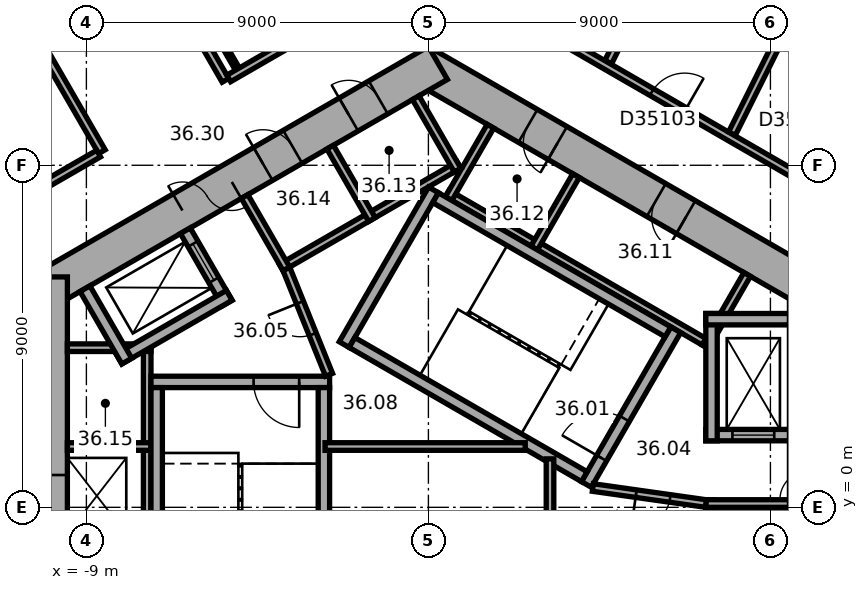
"""IFC4 building model, lengths in metres.
Left out: names, types, materials, properties, quantities, classifications, styles, units other than length and angle.
Written with IfcOpenShell. Run it as: python <this file> out.ifc"""

import sys

from ifc_helpers import new_model, si_unit, direction, frame, frame_2d, origin, place, context, subcontext, project, spatial, rectangle, extrude, element, fill, save


model = new_model("IFC4")
c1 = context("Model", 3, precision=1e-05, world=origin(), true_north=direction((0.0, 1.0)))
c2 = subcontext(c1, "Body", "Model", "MODEL_VIEW")
j1 = project(units=[si_unit("LENGTHUNIT", "METRE"), si_unit("PLANEANGLEUNIT", "RADIAN")], contexts=[c1])
p1 = place(None, origin())
s1 = spatial("IfcSite", under=j1, at=p1, CompositionType="ELEMENT")
p2 = place(p1, origin())
s2 = spatial("IfcBuilding", under=s1, at=p2, CompositionType="ELEMENT")
p3 = place(p2, frame((0.0, 0.0, 150.3)))
s3 = spatial("IfcBuildingStorey", under=s2, at=p3, CompositionType="ELEMENT", Elevation=150.3)
p4 = place(p3, frame((10.25, 5.629, 0.0), z_axis=(0.0, 0.0, 1.0), x_axis=(-0.866022616891, 0.50000482701, 0.0)))
e1 = element("IfcWall", 1, at=p4, inside=s3, PredefinedType="SHEAR", context=c2, shape_type="SweptSolid", body=[
    extrude(rectangle(XDim=12.125, YDim=1.0, at=frame_2d((6.062, 0.0))), origin(), (0.0, 0.0, 1.0), 3.7),
])
p5 = place(p4, frame((4.012, 0.0, 0.0)))
e2 = element("IfcOpeningElement", 2, at=p5, cuts=e1, PredefinedType="OPENING", context=c2, shape_type="SweptSolid", body=[
    extrude(rectangle(XDim=0.9, YDim=2.1, at=frame_2d((0.45, 1.05))), frame((0.0, 0.51, 0.0), z_axis=(0.0, -1.0, 0.0), x_axis=(1.0, 0.0, 0.0)), (0.0, 0.0, 1.0), 1.02),
])
p6 = place(p4, frame((7.912, 0.0, 0.0)))
e3 = element("IfcOpeningElement", 3, at=p6, cuts=e1, PredefinedType="OPENING", context=c2, shape_type="SweptSolid", body=[
    extrude(rectangle(XDim=0.9, YDim=2.1, at=frame_2d((0.45, 1.05))), frame((0.0, 0.51, 0.0), z_axis=(0.0, -1.0, 0.0), x_axis=(1.0, 0.0, 0.0)), (0.0, 0.0, 1.0), 1.02),
])
p7 = place(p3, frame((0.25, 11.691, 0.0), z_axis=(0.0, 0.0, 1.0), x_axis=(-0.866022616891, -0.50000482701, 0.0)))
e4 = element("IfcWall", 4, at=p7, inside=s3, PredefinedType="SHEAR", context=c2, shape_type="SweptSolid", body=[
    extrude(rectangle(XDim=12.125, YDim=1.0, at=frame_2d((6.062, 0.0))), origin(), (0.0, 0.0, 1.0), 3.7),
])
p8 = place(p7, frame((6.262, 0.0, 0.0)))
e5 = element("IfcOpeningElement", 5, at=p8, cuts=e4, PredefinedType="OPENING", context=c2, shape_type="SweptSolid", body=[
    extrude(rectangle(XDim=1.5, YDim=2.1, at=frame_2d((0.75, 1.05))), frame((0.0, 0.51, 0.0), z_axis=(0.0, -1.0, 0.0), x_axis=(1.0, 0.0, 0.0)), (0.0, 0.0, 1.0), 1.02),
])
p9 = place(p7, frame((1.812, 0.0, 0.0)))
e6 = element("IfcOpeningElement", 6, at=p9, cuts=e4, PredefinedType="OPENING", context=c2, shape_type="SweptSolid", body=[
    extrude(rectangle(XDim=0.9, YDim=2.1, at=frame_2d((0.45, 1.05))), frame((0.0, 0.51, 0.0), z_axis=(0.0, -1.0, 0.0), x_axis=(1.0, 0.0, 0.0)), (0.0, 0.0, 1.0), 1.02),
])
p10 = place(p7, frame((4.412, 0.0, 0.0)))
e7 = element("IfcOpeningElement", 7, at=p10, cuts=e4, PredefinedType="OPENING", context=c2, shape_type="SweptSolid", body=[
    extrude(rectangle(XDim=0.9, YDim=2.1, at=frame_2d((0.45, 1.05))), frame((0.0, 0.51, 0.0), z_axis=(0.0, -1.0, 0.0), x_axis=(1.0, 0.0, 0.0)), (0.0, 0.0, 1.0), 1.02),
])
p11 = place(p3, frame((-10.0, 6.062, 0.0), z_axis=(0.0, 0.0, 1.0), x_axis=(0.0, -1.0, 0.0)))
e8 = element("IfcWall", 8, at=p11, inside=s3, PredefinedType="SHEAR", context=c2, shape_type="SweptSolid", body=[
    extrude(rectangle(XDim=12.125, YDim=1.0, at=frame_2d((6.062, 0.0))), origin(), (0.0, 0.0, 1.0), 3.7),
])
p12 = place(p11, frame((5.212, 0.0, 0.0)))
e9 = element("IfcOpeningElement", 9, at=p12, cuts=e8, PredefinedType="OPENING", context=c2, shape_type="SweptSolid", body=[
    extrude(rectangle(XDim=1.1, YDim=2.1, at=frame_2d((0.55, 1.05))), frame((0.0, 0.51, 0.0), z_axis=(0.0, -1.0, 0.0), x_axis=(1.0, 0.0, 0.0)), (0.0, 0.0, 1.0), 1.02),
])
p13 = place(p11, frame((7.812, 0.0, 0.0)))
e10 = element("IfcOpeningElement", 10, at=p13, cuts=e8, PredefinedType="OPENING", context=c2, shape_type="SweptSolid", body=[
    extrude(rectangle(XDim=1.1, YDim=2.1, at=frame_2d((0.55, 1.05))), frame((0.0, 0.51, 0.0), z_axis=(0.0, -1.0, 0.0), x_axis=(1.0, 0.0, 0.0)), (0.0, 0.0, 1.0), 1.02),
])
p14 = place(p3, frame((7.4, -5.2, 0.0), z_axis=(0.0, 0.0, 1.0), x_axis=(0.0, 1.0, 0.0)))
e11 = element("IfcWall", 11, at=p14, inside=s3, PredefinedType="PARTITIONING", context=c2, shape_type="SweptSolid", body=[
    extrude(rectangle(XDim=5.4, YDim=0.2, at=frame_2d((2.7, 0.0))), origin(), (0.0, 0.0, 1.0), 3.42),
])
p15 = place(p3, frame((7.3, 0.1, 0.0), z_axis=(0.0, 0.0, 1.0), x_axis=(1.0, 0.0, 0.0)))
e12 = element("IfcWall", 12, at=p15, inside=s3, PredefinedType="PARTITIONING", context=c2, shape_type="SweptSolid", body=[
    extrude(rectangle(XDim=2.2, YDim=0.2, at=frame_2d((1.1, 0.0))), origin(), (0.0, 0.0, 1.0), 3.42),
])
p16 = place(p3, frame((7.424, 4.259, 0.0), z_axis=(0.0, 0.0, 1.0), x_axis=(-0.866026010844, 0.49999894854, 0.0)))
e13 = element("IfcWall", 13, at=p16, inside=s3, PredefinedType="PARTITIONING", context=c2, shape_type="SweptSolid", body=[
    extrude(rectangle(XDim=8.0, YDim=0.2, at=frame_2d((4.0, 0.0))), origin(), (0.0, 0.0, 1.0), 3.42),
])
for number, where, z_axis, x_axis in (
    (14, (7.287, 4.222, 0.0), (0.0, 0.0, 1.0), (0.5, 0.866, 0.0)),
    (15, (2.784, 6.822, 0.0), (0.0, 0.0, 1.0), (0.5, 0.866, 0.0)),
    (16, (0.532, 8.122, 0.0), (0.0, 0.0, 1.0), (0.5, 0.866, 0.0)),
):
    element("IfcWall", number, at=place(p3, frame(where, z_axis=z_axis, x_axis=x_axis)), inside=s3, PredefinedType="PARTITIONING", context=c2, shape_type="SweptSolid", body=[
        extrude(rectangle(XDim=2.2, YDim=0.2, at=frame_2d((1.1, 0.0))), origin(), (0.0, 0.0, 1.0), 3.42),
    ])
p17 = place(p3, frame((0.803, 9.009, 0.0), z_axis=(0.0, 0.0, 1.0), x_axis=(-0.866028230842, -0.499995103361, 0.0)))
e17 = element("IfcWall", 17, at=p17, inside=s3, PredefinedType="PARTITIONING", context=c2, shape_type="SweptSolid", body=[
    extrude(rectangle(XDim=5.4, YDim=0.2, at=frame_2d((2.7, 0.0))), origin(), (0.0, 0.0, 1.0), 3.42),
])
p18 = place(p3, frame((0.767, 8.872, 0.0), z_axis=(0.0, 0.0, 1.0), x_axis=(-0.499994660107, 0.866028486751, 0.0)))
e18 = element("IfcWall", 18, at=p18, inside=s3, PredefinedType="PARTITIONING", context=c2, shape_type="SweptSolid", body=[
    extrude(rectangle(XDim=2.2, YDim=0.2, at=frame_2d((1.1, 0.0))), origin(), (0.0, 0.0, 1.0), 3.42),
])
for number, where, z_axis, x_axis in (
    (19, (-1.485, 7.572, 0.0), (0.0, 0.0, 1.0), (-0.5, 0.866, 0.0)),
    (20, (-3.737, 6.272, 0.0), (0.0, 0.0, 1.0), (-0.5, 0.866, 0.0)),
):
    element("IfcWall", number, at=place(p3, frame(where, z_axis=z_axis, x_axis=x_axis)), inside=s3, PredefinedType="PARTITIONING", context=c2, shape_type="SweptSolid", body=[
        extrude(rectangle(XDim=2.2, YDim=0.2, at=frame_2d((1.1, 0.0))), origin(), (0.0, 0.0, 1.0), 3.42),
    ])
p19 = place(p3, frame((-7.4, 4.3, 0.0), z_axis=(0.0, 0.0, 1.0), x_axis=(0.0, -1.0, 0.0)))
e21 = element("IfcWall", 21, at=p19, inside=s3, PredefinedType="PARTITIONING", context=c2, shape_type="SweptSolid", body=[
    extrude(rectangle(XDim=8.0, YDim=0.2, at=frame_2d((4.0, 0.0))), origin(), (0.0, 0.0, 1.0), 3.42),
])
for number, where, z_axis, x_axis in (
    (22, (-7.3, 4.2, 0.0), (0.0, 0.0, 1.0), (-1.0, 0.0, 0.0)),
    (23, (-7.3, 1.6, 0.0), (0.0, 0.0, 1.0), (-1.0, 0.0, 0.0)),
):
    element("IfcWall", number, at=place(p3, frame(where, z_axis=z_axis, x_axis=x_axis)), inside=s3, PredefinedType="PARTITIONING", context=c2, shape_type="SweptSolid", body=[
        extrude(rectangle(XDim=2.2, YDim=0.2, at=frame_2d((1.1, 0.0))), origin(), (0.0, 0.0, 1.0), 3.42),
    ])
p20 = place(p3, frame((4.158, 0.602, 0.0), z_axis=(0.0, 0.0, 1.0), x_axis=(0.499977259774, 0.866038532462, 0.0)))
e24 = element("IfcWall", 24, at=p20, inside=s3, PredefinedType="SHEAR", context=c2, shape_type="SweptSolid", body=[
    extrude(rectangle(XDim=4.7, YDim=0.3, at=frame_2d((2.35, 0.0))), origin(), (0.0, 0.0, 1.0), 3.42),
])
p21 = place(p20, frame((0.8, 0.0, 0.0)))
e25 = element("IfcOpeningElement", 25, at=p21, cuts=e24, PredefinedType="OPENING", context=c2, shape_type="SweptSolid", body=[
    extrude(rectangle(XDim=1.2, YDim=2.1, at=frame_2d((0.6, 1.05))), frame((0.0, 0.16, 0.0), z_axis=(0.0, -1.0, 0.0), x_axis=(1.0, 0.0, 0.0)), (0.0, 0.0, 1.0), 0.32),
])
p22 = place(p3, frame((-2.216, 4.282, 0.0), z_axis=(0.0, 0.0, 1.0), x_axis=(0.499977259774, 0.866038532462, 0.0)))
e26 = element("IfcWall", 26, at=p22, inside=s3, PredefinedType="SHEAR", context=c2, shape_type="SweptSolid", body=[
    extrude(rectangle(XDim=4.7, YDim=0.3, at=frame_2d((2.35, 0.0))), origin(), (0.0, 0.0, 1.0), 3.42),
])
for number, where, z_axis, x_axis in (
    (27, (4.103, 0.807, 0.0), (0.0, 0.0, 1.0), (-0.866, 0.5, 0.0)),
    (28, (6.303, 4.617, 0.0), (0.0, 0.0, 1.0), (-0.866, 0.5, 0.0)),
):
    element("IfcWall", number, at=place(p3, frame(where, z_axis=z_axis, x_axis=x_axis)), inside=s3, PredefinedType="SHEAR", context=c2, shape_type="SweptSolid", body=[
        extrude(rectangle(XDim=7.06, YDim=0.3, at=frame_2d((3.53, 0.0))), origin(), (0.0, 0.0, 1.0), 3.42),
    ])
p23 = place(p3, frame((-2.6, 3.3, 0.0), z_axis=(0.0, 0.0, 1.0), x_axis=(-1.0, 0.0, 0.0)))
e29 = element("IfcWall", 29, at=p23, inside=s3, PredefinedType="SHEAR", context=c2, shape_type="SweptSolid", body=[
    extrude(rectangle(XDim=4.7, YDim=0.3, at=frame_2d((2.35, 0.0))), origin(), (0.0, 0.0, 1.0), 3.42),
])
p24 = place(p23, frame((0.8, 0.0, 0.0)))
e30 = element("IfcOpeningElement", 30, at=p24, cuts=e29, PredefinedType="OPENING", context=c2, shape_type="SweptSolid", body=[
    extrude(rectangle(XDim=1.2, YDim=2.1, at=frame_2d((0.6, 1.05))), frame((0.0, 0.16, 0.0), z_axis=(0.0, -1.0, 0.0), x_axis=(1.0, 0.0, 0.0)), (0.0, 0.0, 1.0), 0.32),
])
for number, where, z_axis, x_axis in (
    (31, (-2.75, 3.15, 0.0), (0.0, 0.0, 1.0), (0.0, -1.0, 0.0)),
    (32, (-7.15, 3.15, 0.0), (0.0, 0.0, 1.0), (0.0, -1.0, 0.0)),
):
    element("IfcWall", number, at=place(p3, frame(where, z_axis=z_axis, x_axis=x_axis)), inside=s3, PredefinedType="SHEAR", context=c2, shape_type="SweptSolid", body=[
        extrude(rectangle(XDim=7.06, YDim=0.3, at=frame_2d((3.53, 0.0))), origin(), (0.0, 0.0, 1.0), 3.42),
    ])
p25 = place(p3, frame((7.3, 1.9, 0.0), z_axis=(0.0, 0.0, 1.0), x_axis=(1.0, 0.0, 0.0)))
e33 = element("IfcWall", 33, at=p25, inside=s3, PredefinedType="SHEAR", context=c2, shape_type="SweptSolid", body=[
    extrude(rectangle(XDim=2.2, YDim=0.3, at=frame_2d((1.1, 0.0))), origin(), (0.0, 0.0, 1.0), 3.42),
])
p26 = place(p25, frame((0.7, 0.0, 0.0)))
e34 = element("IfcOpeningElement", 34, at=p26, cuts=e33, PredefinedType="OPENING", context=c2, shape_type="SweptSolid", body=[
    extrude(rectangle(XDim=1.1, YDim=2.1, at=frame_2d((0.55, 1.05))), frame((0.0, 0.16, 0.0), z_axis=(0.0, -1.0, 0.0), x_axis=(1.0, 0.0, 0.0)), (0.0, 0.0, 1.0), 0.32),
])
p27 = place(p3, frame((7.45, 1.75, 0.0), z_axis=(0.0, 0.0, 1.0), x_axis=(0.0, 1.0, 0.0)))
e35 = element("IfcWall", 35, at=p27, inside=s3, PredefinedType="SHEAR", context=c2, shape_type="SweptSolid", body=[
    extrude(rectangle(XDim=3.35, YDim=0.3, at=frame_2d((1.675, 0.0))), origin(), (0.0, 0.0, 1.0), 3.42),
])
p28 = place(p3, frame((7.3, 4.95, 0.0), z_axis=(0.0, 0.0, 1.0), x_axis=(1.0, 0.0, 0.0)))
e36 = element("IfcWall", 36, at=p28, inside=s3, PredefinedType="SHEAR", context=c2, shape_type="SweptSolid", body=[
    extrude(rectangle(XDim=2.2, YDim=0.3, at=frame_2d((1.1, 0.0))), origin(), (0.0, 0.0, 1.0), 3.42),
])
p29 = place(p3, frame((4.327, 0.521, 0.0), z_axis=(0.0, 0.0, 1.0), x_axis=(0.990124376366, -0.14019172346, 0.0)))
e37 = element("IfcWall", 37, at=p29, inside=s3, PredefinedType="PARTITIONING", context=c2, shape_type="SweptSolid", body=[
    extrude(rectangle(XDim=3.002, YDim=0.2, at=frame_2d((1.501, 0.0))), origin(), (0.0, 0.0, 1.0), 3.42),
])
p30 = place(p29, frame((1.15, 0.0, 0.0)))
e38 = element("IfcOpeningElement", 38, at=p30, cuts=e37, PredefinedType="OPENING", context=c2, shape_type="SweptSolid", body=[
    extrude(rectangle(XDim=0.9, YDim=2.1, at=frame_2d((0.45, 1.05))), frame((0.0, 0.11, 0.0), z_axis=(0.0, -1.0, 0.0), x_axis=(1.0, 0.0, 0.0)), (0.0, 0.0, 1.0), 0.22),
])
p31 = place(p3, frame((-5.295, 5.372, 0.0), z_axis=(0.0, 0.0, 1.0), x_axis=(-0.500077893725, 0.86598042715, 0.0)))
e39 = element("IfcWall", 39, at=p31, inside=s3, PredefinedType="SHEAR", context=c2, shape_type="SweptSolid", body=[
    extrude(rectangle(XDim=2.2, YDim=0.3, at=frame_2d((1.1, 0.0))), origin(), (0.0, 0.0, 1.0), 3.42),
])
p32 = place(p31, frame((0.7, 0.0, 0.0)))
e40 = element("IfcOpeningElement", 40, at=p32, cuts=e39, PredefinedType="OPENING", context=c2, shape_type="SweptSolid", body=[
    extrude(rectangle(XDim=1.1, YDim=2.1, at=frame_2d((0.55, 1.05))), frame((0.0, 0.16, 0.0), z_axis=(0.0, -1.0, 0.0), x_axis=(1.0, 0.0, 0.0)), (0.0, 0.0, 1.0), 0.32),
])
p33 = place(p3, frame((-5.24, 5.577, 0.0), z_axis=(0.0, 0.0, 1.0), x_axis=(-0.866014461049, -0.500018952895, 0.0)))
e41 = element("IfcWall", 41, at=p33, inside=s3, PredefinedType="SHEAR", context=c2, shape_type="SweptSolid", body=[
    extrude(rectangle(XDim=3.35, YDim=0.3, at=frame_2d((1.675, 0.0))), origin(), (0.0, 0.0, 1.0), 3.42),
])
p34 = place(p3, frame((-7.937, 3.847, 0.0), z_axis=(0.0, 0.0, 1.0), x_axis=(-0.50002983664, 0.866008176907, 0.0)))
e42 = element("IfcWall", 42, at=p34, inside=s3, PredefinedType="SHEAR", context=c2, shape_type="SweptSolid", body=[
    extrude(rectangle(XDim=2.2, YDim=0.3, at=frame_2d((1.1, 0.0))), origin(), (0.0, 0.0, 1.0), 3.42),
])
p35 = place(p3, frame((-2.615, 3.487, 0.0), z_axis=(0.0, 0.0, 1.0), x_axis=(-0.373576831041, 0.92759924068, 0.0)))
e43 = element("IfcWall", 43, at=p35, inside=s3, PredefinedType="PARTITIONING", context=c2, shape_type="SweptSolid", body=[
    extrude(rectangle(XDim=3.002, YDim=0.2, at=frame_2d((1.501, 0.0))), origin(), (0.0, 0.0, 1.0), 3.42),
])
p36 = place(p35, frame((1.15, 0.0, 0.0)))
e44 = element("IfcOpeningElement", 44, at=p36, cuts=e43, PredefinedType="OPENING", context=c2, shape_type="SweptSolid", body=[
    extrude(rectangle(XDim=0.9, YDim=2.1, at=frame_2d((0.45, 1.05))), frame((0.0, 0.11, 0.0), z_axis=(0.0, -1.0, 0.0), x_axis=(1.0, 0.0, 0.0)), (0.0, 0.0, 1.0), 0.22),
])
p37 = place(p3, frame((-2.72, 1.6, 0.0), z_axis=(0.0, 0.0, 1.0), x_axis=(1.0, 0.0, 0.0)))
e45 = element("IfcWall", 45, at=p37, inside=s3, PredefinedType="PARTITIONING", context=c2, shape_type="SweptSolid", body=[
    extrude(rectangle(XDim=5.269, YDim=0.2, at=frame_2d((2.634, 0.0))), origin(), (0.0, 0.0, 1.0), 3.42),
])
p38 = place(p3, frame((3.2, -1.275, 0.0), z_axis=(0.0, 0.0, 1.0), x_axis=(0.0, 1.0, 0.0)))
e46 = element("IfcWall", 46, at=p38, inside=s3, PredefinedType="PARTITIONING", context=c2, shape_type="SweptSolid", body=[
    extrude(rectangle(XDim=2.549, YDim=0.2, at=frame_2d((1.275, 0.0))), origin(), (0.0, 0.0, 1.0), 3.42),
])
p39 = place(p3, frame((-12.766, 16.589, 0.0), z_axis=(0.0, 0.0, 1.0), x_axis=(0.500010139422, -0.866019549707, 0.0)))
e47 = element("IfcWall", 47, at=p39, inside=s3, PredefinedType="PARTITIONING", context=c2, shape_type="SweptSolid", body=[
    extrude(rectangle(XDim=8.35, YDim=0.2, at=frame_2d((4.175, 0.0))), origin(), (0.0, 0.0, 1.0), 3.42),
])
p40 = place(p39, frame((3.675, 0.0, 0.0)))
e48 = element("IfcOpeningElement", 48, at=p40, cuts=e47, PredefinedType="OPENING", context=c2, shape_type="SweptSolid", body=[
    extrude(rectangle(XDim=1.0, YDim=2.1, at=frame_2d((0.5, 1.05))), frame((0.0, 0.11, 0.0), z_axis=(0.0, -1.0, 0.0), x_axis=(1.0, 0.0, 0.0)), (0.0, 0.0, 1.0), 0.22),
])
p41 = place(p3, frame((-9.515, 18.466, 0.0), z_axis=(0.0, 0.0, 1.0), x_axis=(0.500010139422, -0.866019549707, 0.0)))
e49 = element("IfcWall", 49, at=p41, inside=s3, PredefinedType="PARTITIONING", context=c2, shape_type="SweptSolid", body=[
    extrude(rectangle(XDim=8.35, YDim=0.2, at=frame_2d((4.175, 0.0))), origin(), (0.0, 0.0, 1.0), 2.87),
])
p42 = place(p41, frame((3.275, 0.0, 0.0)))
e50 = element("IfcOpeningElement", 50, at=p42, cuts=e49, PredefinedType="OPENING", context=c2, shape_type="SweptSolid", body=[
    extrude(rectangle(XDim=1.0, YDim=2.1, at=frame_2d((0.5, 1.05))), frame((0.0, 0.11, 0.0), z_axis=(0.0, -1.0, 0.0), x_axis=(1.0, 0.0, 0.0)), (0.0, 0.0, 1.0), 0.22),
])
p43 = place(p3, frame((-8.678, 9.308, 0.0), z_axis=(0.0, 0.0, 1.0), x_axis=(-0.866000359435, -0.500043375578, 0.0)))
e51 = element("IfcWall", 51, at=p43, inside=s3, PredefinedType="PARTITIONING", context=c2, shape_type="SweptSolid", body=[
    extrude(rectangle(XDim=3.161, YDim=0.2, at=frame_2d((1.581, 0.0))), origin(), (0.0, 0.0, 1.0), 3.42),
])
p44 = place(p3, frame((-5.027, 11.531, 0.0), z_axis=(0.0, 0.0, 1.0), x_axis=(-0.499995802899, 0.866027826969, 0.0)))
e52 = element("IfcWall", 52, at=p44, inside=s3, PredefinedType="PARTITIONING", context=c2, shape_type="SweptSolid", body=[
    extrude(rectangle(XDim=3.84, YDim=0.12, at=frame_2d((1.92, 0.0))), origin(), (0.0, 0.0, 1.0), 3.42),
])
p45 = place(p3, frame((-1.167, 13.645, 0.0), z_axis=(0.0, 0.0, 1.0), x_axis=(-0.866034830959, -0.499983671299, 0.0)))
e53 = element("IfcWall", 53, at=p45, inside=s3, PredefinedType="PARTITIONING", context=c2, shape_type="SweptSolid", body=[
    extrude(rectangle(XDim=4.719, YDim=0.2, at=frame_2d((2.36, 0.0))), origin(), (0.0, 0.0, 1.0), 3.42),
])
p46 = place(p3, frame((8.37, 19.013, 0.0), z_axis=(0.0, 0.0, 1.0), x_axis=(-0.446183598632, -0.894941448538, 0.0)))
e54 = element("IfcWall", 54, at=p46, inside=s3, PredefinedType="PARTITIONING", context=c2, shape_type="SweptSolid", body=[
    extrude(rectangle(XDim=8.156, YDim=0.2, at=frame_2d((4.078, 0.0))), origin(), (0.0, 0.0, 1.0), 3.42),
])
p47 = place(p3, frame((11.233, 7.833, 0.0), z_axis=(0.0, 0.0, 1.0), x_axis=(-0.866021713988, 0.50000639086, 0.0)))
e55 = element("IfcWall", 55, at=p47, inside=s3, PredefinedType="PARTITIONING", context=c2, shape_type="SweptSolid", body=[
    extrude(rectangle(XDim=11.834, YDim=0.2, at=frame_2d((5.917, 0.0))), origin(), (0.0, 0.0, 1.0), 3.42),
])
p48 = place(p47, frame((5.185, 0.0, 0.0)))
e56 = element("IfcOpeningElement", 56, at=p48, cuts=e55, PredefinedType="OPENING", context=c2, shape_type="SweptSolid", body=[
    extrude(rectangle(XDim=1.0, YDim=2.1, at=frame_2d((0.5, 1.05))), frame((0.0, 0.11, 0.0), z_axis=(0.0, -1.0, 0.0), x_axis=(1.0, 0.0, 0.0)), (0.0, 0.0, 1.0), 0.22),
])
p49 = place(p3, frame((11.73, 17.338, 0.0), z_axis=(0.0, 0.0, 1.0), x_axis=(-0.446165200553, -0.894950620881, 0.0)))
e57 = element("IfcWall", 57, at=p49, inside=s3, PredefinedType="PARTITIONING", context=c2, shape_type="SweptSolid", body=[
    extrude(rectangle(XDim=8.386, YDim=0.2, at=frame_2d((4.193, 0.0))), origin(), (0.0, 0.0, 1.0), 2.87),
])
p50 = place(p8, origin())
e58 = element("IfcDoor", 58, at=p50, inside=s3, OperationType="DOUBLE_DOOR_SINGLE_SWING", PredefinedType="DOOR", context=c2, shape_type="SweptSolid", body=[
    extrude(rectangle(XDim=1.5, YDim=2.1, at=frame_2d((0.75, 1.05))), frame((0.0, 0.025, 0.0), z_axis=(0.0, -1.0, 0.0), x_axis=(1.0, 0.0, 0.0)), (0.0, 0.0, 1.0), 0.05),
])
fill(e5, e58)
p51 = place(p21, origin())
e59 = element("IfcDoor", 59, at=p51, inside=s3, OperationType="SINGLE_SWING_RIGHT", PredefinedType="DOOR", context=c2, shape_type="SweptSolid", body=[
    extrude(rectangle(XDim=1.2, YDim=2.1, at=frame_2d((0.6, 1.05))), frame((0.0, 0.025, 0.0), z_axis=(0.0, -1.0, 0.0), x_axis=(1.0, 0.0, 0.0)), (0.0, 0.0, 1.0), 0.05),
])
fill(e25, e59)
p52 = place(p24, origin())
e60 = element("IfcDoor", 60, at=p52, inside=s3, OperationType="SINGLE_SWING_RIGHT", PredefinedType="DOOR", context=c2, shape_type="SweptSolid", body=[
    extrude(rectangle(XDim=1.2, YDim=2.1, at=frame_2d((0.6, 1.05))), frame((0.0, 0.025, 0.0), z_axis=(0.0, -1.0, 0.0), x_axis=(1.0, 0.0, 0.0)), (0.0, 0.0, 1.0), 0.05),
])
fill(e30, e60)
p53 = place(p30, origin())
e61 = element("IfcDoor", 61, at=p53, inside=s3, OperationType="SINGLE_SWING_LEFT", PredefinedType="DOOR", context=c2, shape_type="SweptSolid", body=[
    extrude(rectangle(XDim=0.9, YDim=2.1, at=frame_2d((0.45, 1.05))), frame((0.0, 0.025, 0.0), z_axis=(0.0, -1.0, 0.0), x_axis=(1.0, 0.0, 0.0)), (0.0, 0.0, 1.0), 0.05),
])
fill(e38, e61)
p54 = place(p36, origin())
e62 = element("IfcDoor", 62, at=p54, inside=s3, OperationType="SINGLE_SWING_LEFT", PredefinedType="DOOR", context=c2, shape_type="SweptSolid", body=[
    extrude(rectangle(XDim=0.9, YDim=2.1, at=frame_2d((0.45, 1.05))), frame((0.0, 0.025, 0.0), z_axis=(0.0, -1.0, 0.0), x_axis=(1.0, 0.0, 0.0)), (0.0, 0.0, 1.0), 0.05),
])
fill(e44, e62)
p55 = place(p5, origin())
e63 = element("IfcDoor", 63, at=p55, inside=s3, OperationType="SINGLE_SWING_LEFT", PredefinedType="DOOR", context=c2, shape_type="SweptSolid", body=[
    extrude(rectangle(XDim=0.9, YDim=2.1, at=frame_2d((0.45, 1.05))), frame((0.0, 0.025, 0.0), z_axis=(0.0, -1.0, 0.0), x_axis=(1.0, 0.0, 0.0)), (0.0, 0.0, 1.0), 0.05),
])
fill(e2, e63)
p56 = place(p6, origin())
e64 = element("IfcDoor", 64, at=p56, inside=s3, OperationType="SINGLE_SWING_LEFT", PredefinedType="DOOR", context=c2, shape_type="SweptSolid", body=[
    extrude(rectangle(XDim=0.9, YDim=2.1, at=frame_2d((0.45, 1.05))), frame((0.0, 0.025, 0.0), z_axis=(0.0, -1.0, 0.0), x_axis=(1.0, 0.0, 0.0)), (0.0, 0.0, 1.0), 0.05),
])
fill(e3, e64)
p57 = place(p9, origin())
e65 = element("IfcDoor", 65, at=p57, inside=s3, OperationType="SINGLE_SWING_LEFT", PredefinedType="DOOR", context=c2, shape_type="SweptSolid", body=[
    extrude(rectangle(XDim=0.9, YDim=2.1, at=frame_2d((0.45, 1.05))), frame((0.0, 0.025, 0.0), z_axis=(0.0, -1.0, 0.0), x_axis=(1.0, 0.0, 0.0)), (0.0, 0.0, 1.0), 0.05),
])
fill(e6, e65)
p58 = place(p10, origin())
e66 = element("IfcDoor", 66, at=p58, inside=s3, OperationType="SINGLE_SWING_LEFT", PredefinedType="DOOR", context=c2, shape_type="SweptSolid", body=[
    extrude(rectangle(XDim=0.9, YDim=2.1, at=frame_2d((0.45, 1.05))), frame((0.0, 0.025, 0.0), z_axis=(0.0, -1.0, 0.0), x_axis=(1.0, 0.0, 0.0)), (0.0, 0.0, 1.0), 0.05),
])
fill(e7, e66)
p59 = place(p26, origin())
e67 = element("IfcDoor", 67, at=p59, inside=s3, OperationType="DOUBLE_DOOR_SLIDING", PredefinedType="DOOR", context=c2, shape_type="SweptSolid", body=[
    extrude(rectangle(XDim=1.1, YDim=2.1, at=frame_2d((0.55, 1.05))), frame((0.0, 0.025, 0.0), z_axis=(0.0, -1.0, 0.0), x_axis=(1.0, 0.0, 0.0)), (0.0, 0.0, 1.0), 0.05),
])
fill(e34, e67)
p60 = place(p32, origin())
e68 = element("IfcDoor", 68, at=p60, inside=s3, OperationType="DOUBLE_DOOR_SLIDING", PredefinedType="DOOR", context=c2, shape_type="SweptSolid", body=[
    extrude(rectangle(XDim=1.1, YDim=2.1, at=frame_2d((0.55, 1.05))), frame((0.0, 0.025, 0.0), z_axis=(0.0, -1.0, 0.0), x_axis=(1.0, 0.0, 0.0)), (0.0, 0.0, 1.0), 0.05),
])
fill(e40, e68)
p61 = place(p48, origin())
e69 = element("IfcDoor", 69, at=p61, inside=s3, OperationType="SINGLE_SWING_LEFT", PredefinedType="DOOR", context=c2, shape_type="SweptSolid", body=[
    extrude(rectangle(XDim=1.0, YDim=2.1, at=frame_2d((0.5, 1.05))), frame((0.0, 0.025, 0.0), z_axis=(0.0, -1.0, 0.0), x_axis=(1.0, 0.0, 0.0)), (0.0, 0.0, 1.0), 0.05),
])
fill(e56, e69)
save(model, sys.argv[1])
